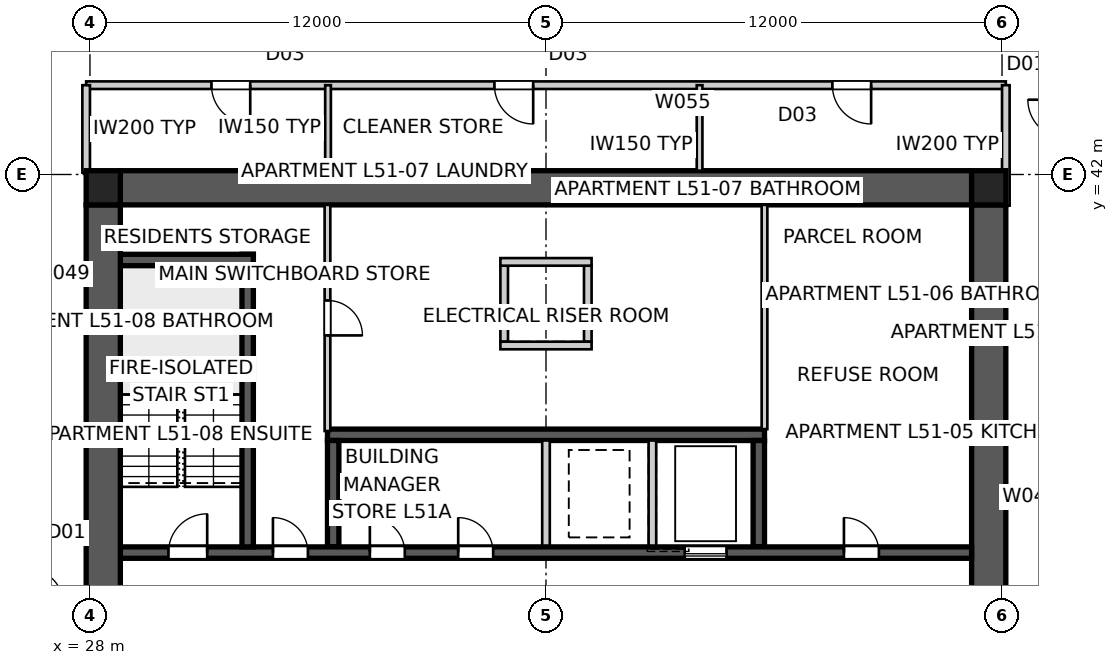
"""IFC4 building model, lengths in metres.
Left out: names, types, materials, properties, quantities, classifications, styles, units other than length and angle.
Written with IfcOpenShell. Run it as: python <this file> out.ifc"""

import sys

from ifc_helpers import new_model, si_unit, direction, frame, frame_2d, origin, origin_2d, place, context, subcontext, project, spatial, polyline, rectangle, outline, extrude, element, fill, save


model = new_model("IFC4")
c1 = context("Model", 3, precision=1e-05, world=origin(), true_north=direction((0.0, 1.0)))
c2 = subcontext(c1, "Body", "Model", "MODEL_VIEW")
j1 = project(units=[si_unit("LENGTHUNIT", "METRE"), si_unit("PLANEANGLEUNIT", "RADIAN")], contexts=[c1])
p1 = place(None, origin())
s1 = spatial("IfcSite", under=j1, at=p1, CompositionType="ELEMENT")
p2 = place(p1, origin())
s2 = spatial("IfcBuilding", under=s1, at=p2, CompositionType="ELEMENT")
p3 = place(p2, frame((0.0, 0.0, 186.2)))
s3 = spatial("IfcBuildingStorey", under=s2, at=p3, CompositionType="ELEMENT", Elevation=186.2)
p4 = place(p3, frame((28.8, 41.65, 0.0), z_axis=(0.0, 0.0, 1.0), x_axis=(1.0, 0.0, 0.0)))
e1 = element("IfcWall", 1, at=p4, inside=s3, PredefinedType="SHEAR", context=c2, shape_type="SweptSolid", body=[
    extrude(outline(polyline([(0.0, -0.45), (22.4, -0.45), (22.4, -0.025), (22.85, -0.025), (22.85, 0.025), (22.4, 0.025), (22.4, 0.45), (0.0, 0.45), (0.0, 0.025), (-0.45, 0.025), (-0.45, -0.025), (0.0, -0.025), (0.0, -0.45)])), origin(), (0.0, 0.0, 1.0), 3.4),
])
p5 = place(p3, frame((51.65, 18.8, 0.0), z_axis=(0.0, 0.0, 1.0), x_axis=(0.0, 1.0, 0.0)))
e2 = element("IfcWall", 2, at=p5, inside=s3, PredefinedType="SHEAR", context=c2, shape_type="SweptSolid", body=[
    extrude(outline(polyline([(0.0, -0.45), (22.4, -0.45), (22.4, -0.025), (22.85, -0.025), (22.85, 0.025), (22.4, 0.025), (22.4, 0.45), (0.0, 0.45), (0.0, 0.025), (-0.45, 0.025), (-0.45, -0.025), (0.0, -0.025), (0.0, -0.45)])), origin(), (0.0, 0.0, 1.0), 3.4),
])
p6 = place(p5, frame((11.14, 0.0, 0.0)))
e3 = element("IfcOpeningElement", 3, at=p6, cuts=e2, PredefinedType="OPENING", context=c2, shape_type="SweptSolid", body=[
    extrude(rectangle(XDim=1.02, YDim=2.4, at=frame_2d((0.51, 1.2))), frame((0.0, 0.46, 0.0), z_axis=(0.0, -1.0, 0.0), x_axis=(1.0, 0.0, 0.0)), (0.0, 0.0, 1.0), 0.92),
])
p7 = place(p3, frame((28.35, 41.2, 0.0), z_axis=(0.0, 0.0, 1.0), x_axis=(0.0, -1.0, 0.0)))
e4 = element("IfcWall", 4, at=p7, inside=s3, PredefinedType="SHEAR", context=c2, shape_type="SweptSolid", body=[
    extrude(outline(polyline([(0.0, -0.45), (22.4, -0.45), (22.4, -0.025), (22.85, -0.025), (22.85, 0.025), (22.4, 0.025), (22.4, 0.45), (0.0, 0.45), (0.0, 0.025), (-0.45, 0.025), (-0.45, -0.025), (0.0, -0.025), (0.0, -0.45)])), origin(), (0.0, 0.0, 1.0), 3.4),
])
p8 = place(p7, frame((11.14, 0.0, 0.0)))
e5 = element("IfcOpeningElement", 5, at=p8, cuts=e4, PredefinedType="OPENING", context=c2, shape_type="SweptSolid", body=[
    extrude(rectangle(XDim=1.02, YDim=2.4, at=frame_2d((0.51, 1.2))), frame((0.0, 0.46, 0.0), z_axis=(0.0, -1.0, 0.0), x_axis=(1.0, 0.0, 0.0)), (0.0, 0.0, 1.0), 0.92),
])
p9 = place(p3, frame((28.8, 32.05, 0.0), z_axis=(0.0, 0.0, 1.0), x_axis=(1.0, 0.0, 0.0)))
e6 = element("IfcWall", 6, at=p9, inside=s3, PredefinedType="SHEAR", context=c2, shape_type="SweptSolid", body=[
    extrude(rectangle(XDim=22.4, YDim=0.3, at=frame_2d((11.2, 0.0))), origin(), (0.0, 0.0, 1.0), 3.4),
])
p10 = place(p9, frame((19.04, 0.0, 0.0)))
e7 = element("IfcOpeningElement", 7, at=p10, cuts=e6, PredefinedType="OPENING", context=c2, shape_type="SweptSolid", body=[
    extrude(rectangle(XDim=0.92, YDim=2.1, at=frame_2d((0.46, 1.05))), frame((0.0, 0.16, 0.0), z_axis=(0.0, -1.0, 0.0), x_axis=(1.0, 0.0, 0.0)), (0.0, 0.0, 1.0), 0.32),
])
p11 = place(p9, frame((1.265, 0.0, 0.0)))
e8 = element("IfcOpeningElement", 8, at=p11, cuts=e6, PredefinedType="OPENING", context=c2, shape_type="SweptSolid", body=[
    extrude(rectangle(XDim=1.02, YDim=2.1, at=frame_2d((0.51, 1.05))), frame((0.0, 0.16, 0.0), z_axis=(0.0, -1.0, 0.0), x_axis=(1.0, 0.0, 0.0)), (0.0, 0.0, 1.0), 0.32),
])
p12 = place(p9, frame((4.015, 0.0, 0.0)))
e9 = element("IfcOpeningElement", 9, at=p12, cuts=e6, PredefinedType="OPENING", context=c2, shape_type="SweptSolid", body=[
    extrude(rectangle(XDim=0.92, YDim=2.1, at=frame_2d((0.46, 1.05))), frame((0.0, 0.16, 0.0), z_axis=(0.0, -1.0, 0.0), x_axis=(1.0, 0.0, 0.0)), (0.0, 0.0, 1.0), 0.32),
])
p13 = place(p9, frame((6.565, 0.0, 0.0)))
e10 = element("IfcOpeningElement", 10, at=p13, cuts=e6, PredefinedType="OPENING", context=c2, shape_type="SweptSolid", body=[
    extrude(rectangle(XDim=0.92, YDim=2.1, at=frame_2d((0.46, 1.05))), frame((0.0, 0.16, 0.0), z_axis=(0.0, -1.0, 0.0), x_axis=(1.0, 0.0, 0.0)), (0.0, 0.0, 1.0), 0.32),
])
p14 = place(p9, frame((8.89, 0.0, 0.0)))
e11 = element("IfcOpeningElement", 11, at=p14, cuts=e6, PredefinedType="OPENING", context=c2, shape_type="SweptSolid", body=[
    extrude(rectangle(XDim=0.92, YDim=2.1, at=frame_2d((0.46, 1.05))), frame((0.0, 0.16, 0.0), z_axis=(0.0, -1.0, 0.0), x_axis=(1.0, 0.0, 0.0)), (0.0, 0.0, 1.0), 0.32),
])
p15 = place(p9, frame((14.85, 0.0, 0.0)))
e12 = element("IfcOpeningElement", 12, at=p15, cuts=e6, PredefinedType="OPENING", context=c2, shape_type="SweptSolid", body=[
    extrude(rectangle(XDim=1.1, YDim=2.1, at=frame_2d((0.55, 1.05))), frame((0.0, 0.16, 0.0), z_axis=(0.0, -1.0, 0.0), x_axis=(1.0, 0.0, 0.0)), (0.0, 0.0, 1.0), 0.32),
])
p16 = place(p3, frame((34.25, 35.15, 0.0), z_axis=(0.0, 0.0, 1.0), x_axis=(1.0, 0.0, 0.0)))
e13 = element("IfcWall", 13, at=p16, inside=s3, PredefinedType="SHEAR", context=c2, shape_type="SweptSolid", body=[
    extrude(rectangle(XDim=11.5, YDim=0.3, at=frame_2d((5.75, 0.0))), origin(), (0.0, 0.0, 1.0), 3.4),
])
p17 = place(p3, frame((34.4, 32.2, 0.0), z_axis=(0.0, 0.0, 1.0), x_axis=(0.0, 1.0, 0.0)))
e14 = element("IfcWall", 14, at=p17, inside=s3, PredefinedType="SHEAR", context=c2, shape_type="SweptSolid", body=[
    extrude(rectangle(XDim=2.8, YDim=0.3, at=frame_2d((1.4, 0.0))), origin(), (0.0, 0.0, 1.0), 3.4),
])
for number, where, z_axis, x_axis in (
    (15, (40.0, 32.2, 0.0), (0.0, 0.0, 1.0), (0.0, 1.0, 0.0)),
    (16, (42.8, 32.2, 0.0), (0.0, 0.0, 1.0), (0.0, 1.0, 0.0)),
):
    element("IfcWall", number, at=place(p3, frame(where, z_axis=z_axis, x_axis=x_axis)), inside=s3, PredefinedType="SOLIDWALL", context=c2, shape_type="SweptSolid", body=[
        extrude(rectangle(XDim=2.8, YDim=0.2, at=frame_2d((1.4, 0.0))), origin(), (0.0, 0.0, 1.0), 3.4),
    ])
p18 = place(p3, frame((45.6, 32.2, 0.0), z_axis=(0.0, 0.0, 1.0), x_axis=(0.0, 1.0, 0.0)))
e17 = element("IfcWall", 17, at=p18, inside=s3, PredefinedType="SHEAR", context=c2, shape_type="SweptSolid", body=[
    extrude(rectangle(XDim=2.8, YDim=0.3, at=frame_2d((1.4, 0.0))), origin(), (0.0, 0.0, 1.0), 3.4),
])
p19 = place(p3, frame((32.15, 32.2, 0.0), z_axis=(0.0, 0.0, 1.0), x_axis=(0.0, 1.0, 0.0)))
e18 = element("IfcWall", 18, at=p19, inside=s3, PredefinedType="SHEAR", context=c2, shape_type="SweptSolid", body=[
    extrude(rectangle(XDim=7.7, YDim=0.3, at=frame_2d((3.85, 0.0))), origin(), (0.0, 0.0, 1.0), 3.4),
])
p20 = place(p3, frame((28.8, 39.75, 0.0), z_axis=(0.0, 0.0, 1.0), x_axis=(1.0, 0.0, 0.0)))
e19 = element("IfcWall", 19, at=p20, inside=s3, PredefinedType="SHEAR", context=c2, shape_type="SweptSolid", body=[
    extrude(rectangle(XDim=3.5, YDim=0.3, at=frame_2d((1.75, 0.0))), origin(), (0.0, 0.0, 1.0), 3.4),
])
for number, where, z_axis, x_axis in (
    (20, (38.9, 37.6, 0.0), (0.0, 0.0, 1.0), (0.0, 1.0, 0.0)),
    (21, (41.1, 37.6, 0.0), (0.0, 0.0, 1.0), (0.0, 1.0, 0.0)),
):
    element("IfcWall", number, at=place(p3, frame(where, z_axis=z_axis, x_axis=x_axis)), inside=s3, PredefinedType="SOLIDWALL", context=c2, shape_type="SweptSolid", body=[
        extrude(rectangle(XDim=2.0, YDim=0.2, at=frame_2d((1.0, 0.0))), origin(), (0.0, 0.0, 1.0), 3.4),
    ])
for number, where, z_axis, x_axis in (
    (22, (38.8, 37.5, 0.0), (0.0, 0.0, 1.0), (1.0, 0.0, 0.0)),
    (23, (38.8, 39.7, 0.0), (0.0, 0.0, 1.0), (1.0, 0.0, 0.0)),
):
    element("IfcWall", number, at=place(p3, frame(where, z_axis=z_axis, x_axis=x_axis)), inside=s3, PredefinedType="SOLIDWALL", context=c2, shape_type="SweptSolid", body=[
        extrude(rectangle(XDim=2.4, YDim=0.2, at=frame_2d((1.2, 0.0))), origin(), (0.0, 0.0, 1.0), 3.4),
    ])
for number, where, z_axis, x_axis in (
    (24, (51.65, 41.65, 0.0), (0.0, 0.0, 1.0), (1.0, 0.0, 0.0)),
    (25, (28.35, 41.65, 0.0), (0.0, 0.0, 1.0), (1.0, 0.0, 0.0)),
):
    element("IfcColumn", number, at=place(p3, frame(where, z_axis=z_axis, x_axis=x_axis)), inside=s3, PredefinedType="COLUMN", context=c2, shape_type="SweptSolid", body=[
        extrude(rectangle(XDim=0.9, YDim=0.9, at=origin_2d()), origin(), (0.0, 0.0, 1.0), 3.4),
    ])
p21 = place(p3, frame((34.25, 41.2, 0.0), z_axis=(0.0, 0.0, 1.0), x_axis=(0.0, -1.0, 0.0)))
e26 = element("IfcWall", 26, at=p21, inside=s3, PredefinedType="SOLIDWALL", context=c2, shape_type="SweptSolid", body=[
    extrude(rectangle(XDim=5.95, YDim=0.15, at=frame_2d((2.975, 0.0))), origin(), (0.0, 0.0, 1.0), 3.25),
])
p22 = place(p21, frame((2.515, 0.0, 0.0)))
e27 = element("IfcOpeningElement", 27, at=p22, cuts=e26, PredefinedType="OPENING", context=c2, shape_type="SweptSolid", body=[
    extrude(rectangle(XDim=0.92, YDim=2.1, at=frame_2d((0.46, 1.05))), frame((0.0, 0.085, 0.0), z_axis=(0.0, -1.0, 0.0), x_axis=(1.0, 0.0, 0.0)), (0.0, 0.0, 1.0), 0.17),
])
p23 = place(p3, frame((45.75, 41.2, 0.0), z_axis=(0.0, 0.0, 1.0), x_axis=(0.0, -1.0, 0.0)))
e28 = element("IfcWall", 28, at=p23, inside=s3, PredefinedType="SOLIDWALL", context=c2, shape_type="SweptSolid", body=[
    extrude(rectangle(XDim=5.9, YDim=0.15, at=frame_2d((2.95, 0.0))), origin(), (0.0, 0.0, 1.0), 3.25),
])
p24 = place(p3, frame((52.1, 44.35, 0.0), z_axis=(0.0, 0.0, 1.0), x_axis=(-1.0, 0.0, 0.0)))
e29 = element("IfcWall", 29, at=p24, inside=s3, PredefinedType="PARTITIONING", context=c2, shape_type="SweptSolid", body=[
    extrude(rectangle(XDim=24.2, YDim=0.2, at=frame_2d((12.1, 0.0))), origin(), (0.0, 0.0, 1.0), 3.25),
])
p25 = place(p24, frame((12.437, 0.0, 0.0)))
e30 = element("IfcOpeningElement", 30, at=p25, cuts=e29, PredefinedType="OPENING", context=c2, shape_type="SweptSolid", body=[
    extrude(rectangle(XDim=1.02, YDim=2.1, at=frame_2d((0.51, 1.05))), frame((0.0, 0.11, 0.0), z_axis=(0.0, -1.0, 0.0), x_axis=(1.0, 0.0, 0.0)), (0.0, 0.0, 1.0), 0.22),
])
p26 = place(p24, frame((3.544, 0.0, 0.0)))
e31 = element("IfcOpeningElement", 31, at=p26, cuts=e29, PredefinedType="OPENING", context=c2, shape_type="SweptSolid", body=[
    extrude(rectangle(XDim=1.02, YDim=2.1, at=frame_2d((0.51, 1.05))), frame((0.0, 0.11, 0.0), z_axis=(0.0, -1.0, 0.0), x_axis=(1.0, 0.0, 0.0)), (0.0, 0.0, 1.0), 0.22),
])
p27 = place(p24, frame((19.883, 0.0, 0.0)))
e32 = element("IfcOpeningElement", 32, at=p27, cuts=e29, PredefinedType="OPENING", context=c2, shape_type="SweptSolid", body=[
    extrude(rectangle(XDim=1.02, YDim=2.1, at=frame_2d((0.51, 1.05))), frame((0.0, 0.11, 0.0), z_axis=(0.0, -1.0, 0.0), x_axis=(1.0, 0.0, 0.0)), (0.0, 0.0, 1.0), 0.22),
])
p28 = place(p3, frame((27.9, 44.35, 0.0), z_axis=(0.0, 0.0, 1.0), x_axis=(0.0, -1.0, 0.0)))
e33 = element("IfcWall", 33, at=p28, inside=s3, PredefinedType="PARTITIONING", context=c2, shape_type="SweptSolid", body=[
    extrude(rectangle(XDim=2.3, YDim=0.2, at=frame_2d((1.15, 0.0))), origin(), (0.0, 0.0, 1.0), 3.25),
])
p29 = place(p3, frame((52.1, 41.18, 0.0), z_axis=(0.0, 0.0, 1.0), x_axis=(0.0, 1.0, 0.0)))
e34 = element("IfcWall", 34, at=p29, inside=s3, PredefinedType="PARTITIONING", context=c2, shape_type="SweptSolid", body=[
    extrude(rectangle(XDim=3.17, YDim=0.2, at=frame_2d((1.585, 0.0))), origin(), (0.0, 0.0, 1.0), 3.25),
])
p30 = place(p3, frame((34.265, 42.1, 0.0), z_axis=(0.0, 0.0, 1.0), x_axis=(0.0, 1.0, 0.0)))
e35 = element("IfcWall", 35, at=p30, inside=s3, PredefinedType="SOLIDWALL", context=c2, shape_type="SweptSolid", body=[
    extrude(rectangle(XDim=2.25, YDim=0.15, at=frame_2d((1.125, 0.0))), origin(), (0.0, 0.0, 1.0), 2.796),
])
p31 = place(p3, frame((44.042, 42.1, 0.0), z_axis=(0.0, 0.0, 1.0), x_axis=(0.0, 1.0, 0.0)))
e36 = element("IfcWall", 36, at=p31, inside=s3, PredefinedType="SOLIDWALL", context=c2, shape_type="SweptSolid", body=[
    extrude(rectangle(XDim=2.25, YDim=0.15, at=frame_2d((1.125, 0.0))), origin(), (0.0, 0.0, 1.0), 3.25),
])
p32 = place(p10, origin())
e37 = element("IfcDoor", 37, at=p32, inside=s3, OperationType="SINGLE_SWING_LEFT", PredefinedType="DOOR", context=c2, shape_type="SweptSolid", body=[
    extrude(rectangle(XDim=0.92, YDim=2.1, at=frame_2d((0.46, 1.05))), frame((0.0, 0.025, 0.0), z_axis=(0.0, -1.0, 0.0), x_axis=(1.0, 0.0, 0.0)), (0.0, 0.0, 1.0), 0.05),
])
fill(e7, e37)
p33 = place(p11, origin())
e38 = element("IfcDoor", 38, at=p33, inside=s3, OperationType="SINGLE_SWING_RIGHT", PredefinedType="DOOR", context=c2, shape_type="SweptSolid", body=[
    extrude(rectangle(XDim=1.02, YDim=2.1, at=frame_2d((0.51, 1.05))), frame((0.0, 0.025, 0.0), z_axis=(0.0, -1.0, 0.0), x_axis=(1.0, 0.0, 0.0)), (0.0, 0.0, 1.0), 0.05),
])
fill(e8, e38)
p34 = place(p12, origin())
e39 = element("IfcDoor", 39, at=p34, inside=s3, OperationType="SINGLE_SWING_LEFT", PredefinedType="DOOR", context=c2, shape_type="SweptSolid", body=[
    extrude(rectangle(XDim=0.92, YDim=2.1, at=frame_2d((0.46, 1.05))), frame((0.0, 0.025, 0.0), z_axis=(0.0, -1.0, 0.0), x_axis=(1.0, 0.0, 0.0)), (0.0, 0.0, 1.0), 0.05),
])
fill(e9, e39)
p35 = place(p25, origin())
e40 = element("IfcDoor", 40, at=p35, inside=s3, OperationType="SINGLE_SWING_LEFT", PredefinedType="DOOR", context=c2, shape_type="SweptSolid", body=[
    extrude(rectangle(XDim=1.02, YDim=2.1, at=frame_2d((0.51, 1.05))), frame((0.0, 0.025, 0.0), z_axis=(0.0, -1.0, 0.0), x_axis=(1.0, 0.0, 0.0)), (0.0, 0.0, 1.0), 0.05),
])
fill(e30, e40)
p36 = place(p26, origin())
e41 = element("IfcDoor", 41, at=p36, inside=s3, OperationType="SINGLE_SWING_LEFT", PredefinedType="DOOR", context=c2, shape_type="SweptSolid", body=[
    extrude(rectangle(XDim=1.02, YDim=2.1, at=frame_2d((0.51, 1.05))), frame((0.0, 0.025, 0.0), z_axis=(0.0, -1.0, 0.0), x_axis=(1.0, 0.0, 0.0)), (0.0, 0.0, 1.0), 0.05),
])
fill(e31, e41)
p37 = place(p27, origin())
e42 = element("IfcDoor", 42, at=p37, inside=s3, OperationType="SINGLE_SWING_LEFT", PredefinedType="DOOR", context=c2, shape_type="SweptSolid", body=[
    extrude(rectangle(XDim=1.02, YDim=2.1, at=frame_2d((0.51, 1.05))), frame((0.0, 0.025, 0.0), z_axis=(0.0, -1.0, 0.0), x_axis=(1.0, 0.0, 0.0)), (0.0, 0.0, 1.0), 0.05),
])
fill(e32, e42)
p38 = place(p22, origin())
e43 = element("IfcDoor", 43, at=p38, inside=s3, OperationType="SINGLE_SWING_RIGHT", PredefinedType="DOOR", context=c2, shape_type="SweptSolid", body=[
    extrude(rectangle(XDim=0.92, YDim=2.1, at=frame_2d((0.46, 1.05))), frame((0.0, 0.025, 0.0), z_axis=(0.0, -1.0, 0.0), x_axis=(1.0, 0.0, 0.0)), (0.0, 0.0, 1.0), 0.05),
])
fill(e27, e43)
p39 = place(p13, origin())
e44 = element("IfcDoor", 44, at=p39, inside=s3, OperationType="SINGLE_SWING_LEFT", PredefinedType="DOOR", context=c2, shape_type="SweptSolid", body=[
    extrude(rectangle(XDim=0.92, YDim=2.1, at=frame_2d((0.46, 1.05))), frame((0.0, 0.025, 0.0), z_axis=(0.0, -1.0, 0.0), x_axis=(1.0, 0.0, 0.0)), (0.0, 0.0, 1.0), 0.05),
])
fill(e10, e44)
p40 = place(p14, origin())
e45 = element("IfcDoor", 45, at=p40, inside=s3, OperationType="SINGLE_SWING_LEFT", PredefinedType="DOOR", context=c2, shape_type="SweptSolid", body=[
    extrude(rectangle(XDim=0.92, YDim=2.1, at=frame_2d((0.46, 1.05))), frame((0.0, 0.025, 0.0), z_axis=(0.0, -1.0, 0.0), x_axis=(1.0, 0.0, 0.0)), (0.0, 0.0, 1.0), 0.05),
])
fill(e11, e45)
p41 = place(p15, origin())
e46 = element("IfcDoor", 46, at=p41, inside=s3, OperationType="SLIDING_TO_LEFT", PredefinedType="DOOR", context=c2, shape_type="SweptSolid", body=[
    extrude(rectangle(XDim=1.1, YDim=2.1, at=frame_2d((0.55, 1.05))), frame((0.0, 0.025, 0.0), z_axis=(0.0, -1.0, 0.0), x_axis=(1.0, 0.0, 0.0)), (0.0, 0.0, 1.0), 0.05),
])
fill(e12, e46)
save(model, sys.argv[1])
